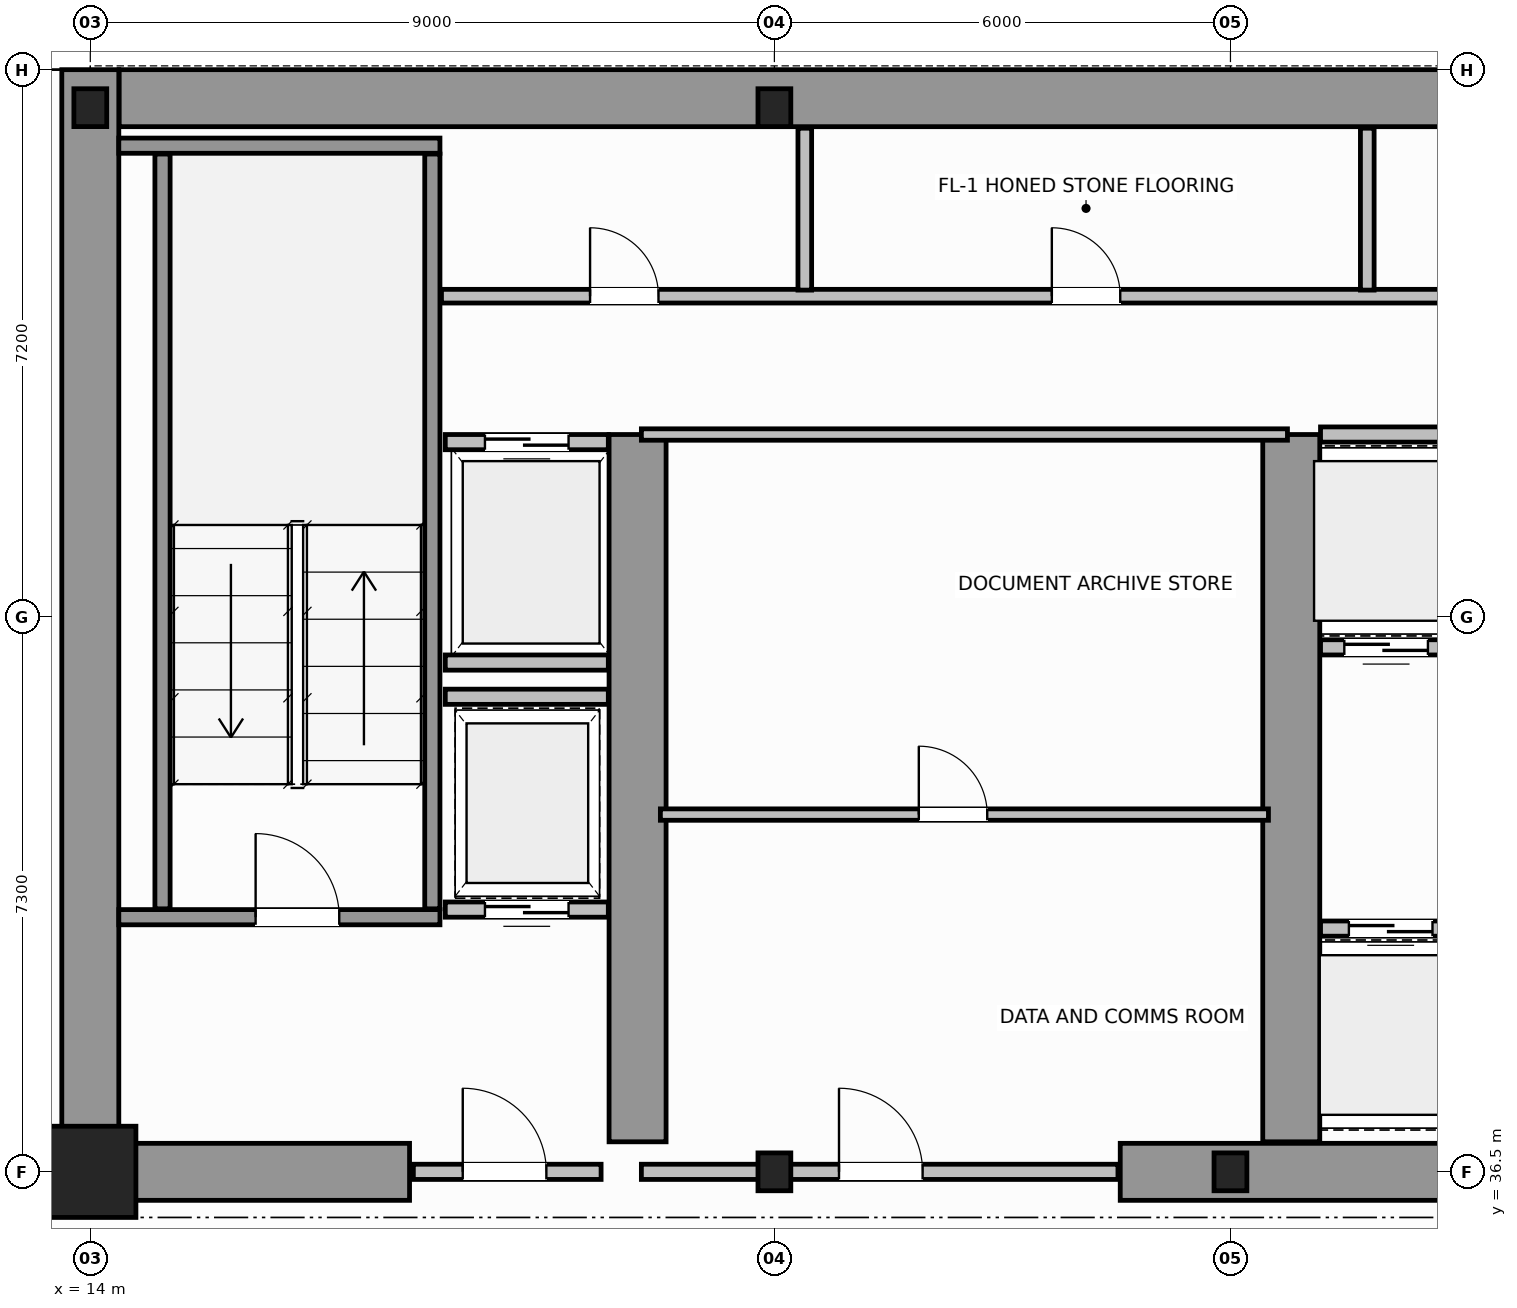
"""IFC4 building model, lengths in metres.
Left out: names, types, materials, properties, quantities, classifications, styles, units other than length and angle.
Written with IfcOpenShell. Run it as: python <this file> out.ifc"""

import sys

from ifc_helpers import new_model, si_unit, direction, frame, frame_2d, origin, origin_2d, place, context, subcontext, project, spatial, rectangle, i_section, extrude, source, transform, mapped, element, fill, save


model = new_model("IFC4")
c1 = context("Model", 3, precision=1e-05, world=origin(), true_north=direction((0.0, 1.0)))
c2 = subcontext(c1, "Body", "Model", "MODEL_VIEW")
j1 = project(units=[si_unit("LENGTHUNIT", "METRE"), si_unit("PLANEANGLEUNIT", "RADIAN")], contexts=[c1])
p1 = place(None, origin())
s1 = spatial("IfcSite", under=j1, at=p1, CompositionType="ELEMENT")
p2 = place(p1, origin())
s2 = spatial("IfcBuilding", under=s1, at=p2, CompositionType="ELEMENT")
p3 = place(p2, frame((0.0, 0.0, 161.4)))
s3 = spatial("IfcBuildingStorey", under=s2, at=p3, CompositionType="ELEMENT", Elevation=161.4)
m1 = source(origin(), c2, "Body", "SweptSolid", [
    extrude(rectangle(XDim=1.2, YDim=1.2, at=origin_2d()), origin(), (0.0, 0.0, 1.0), 3.8),
])
p4 = place(p3, frame((14.0, 36.5, 0.0), z_axis=(0.0, 0.0, 1.0), x_axis=(1.0, 0.0, 0.0)))
e1 = element("IfcColumn", 1, at=p4, inside=s3, PredefinedType="COLUMN", context=c2, shape_type="MappedRepresentation", body=[
    mapped(m1, transform((0.0, 0.0, 0.0), scale=1.0)),
])
m2 = source(origin(), c2, "Body", "SweptSolid", [
    extrude(i_section(OverallWidth=0.432, OverallDepth=0.498, WebThickness=0.055, FlangeThickness=0.068, FilletRadius=0.015, at=origin_2d()), origin(), (0.0, 0.0, 1.0), 3.8),
])
for number, where, z_axis, x_axis in (
    (2, (23.0, 36.5, 0.0), (0.0, 0.0, 1.0), (1.0, 0.0, 0.0)),
    (3, (29.0, 36.5, 0.0), (0.0, 0.0, 1.0), (1.0, 0.0, 0.0)),
    (4, (14.0, 50.5, 0.0), (0.0, 0.0, 1.0), (1.0, 0.0, 0.0)),
    (5, (23.0, 50.5, 0.0), (0.0, 0.0, 1.0), (1.0, 0.0, 0.0)),
):
    element("IfcColumn", number, at=place(p3, frame(where, z_axis=z_axis, x_axis=x_axis)), inside=s3, PredefinedType="COLUMN", context=c2, shape_type="MappedRepresentation", body=[
        mapped(m2, transform((0.0, 0.0, 0.0), scale=1.0)),
    ])
p5 = place(p3, frame((14.379, 50.625, 0.0), z_axis=(0.0, 0.0, 1.0), x_axis=(1.0, 0.0, 0.0)))
e6 = element("IfcWall", 6, at=p5, inside=s3, PredefinedType="SHEAR", context=c2, shape_type="SweptSolid", body=[
    extrude(rectangle(XDim=19.619, YDim=0.75, at=frame_2d((9.81, 0.0))), origin(), (0.0, 0.0, 1.0), 3.8),
])
p6 = place(p3, frame((14.0, 36.5, 0.0), z_axis=(0.0, 0.0, 1.0), x_axis=(0.0, 1.0, 0.0)))
e7 = element("IfcWall", 7, at=p6, inside=s3, PredefinedType="SHEAR", context=c2, shape_type="SweptSolid", body=[
    extrude(rectangle(XDim=14.5, YDim=0.75, at=frame_2d((7.25, 0.0))), origin(), (0.0, 0.0, 1.0), 3.8),
])
p7 = place(p3, frame((14.395, 36.5, 0.0), z_axis=(0.0, 0.0, 1.0), x_axis=(1.0, 0.0, 0.0)))
e8 = element("IfcWall", 8, at=p7, inside=s3, PredefinedType="SHEAR", context=c2, shape_type="SweptSolid", body=[
    extrude(rectangle(XDim=3.805, YDim=0.75, at=frame_2d((1.902, 0.0))), origin(), (0.0, 0.0, 1.0), 2.38),
])
p8 = place(p3, frame((27.55, 36.5, 0.0), z_axis=(0.0, 0.0, 1.0), x_axis=(1.0, 0.0, 0.0)))
e9 = element("IfcWall", 9, at=p8, inside=s3, PredefinedType="SHEAR", context=c2, shape_type="SweptSolid", body=[
    extrude(rectangle(XDim=4.5, YDim=0.75, at=frame_2d((2.25, 0.0))), origin(), (0.0, 0.0, 1.0), 3.8),
])
for number, where, z_axis, x_axis in (
    (10, (21.2, 36.895, 0.0), (0.0, 0.0, 1.0), (0.0, 1.0, 0.0)),
    (11, (29.8, 36.895, 0.0), (0.0, 0.0, 1.0), (0.0, 1.0, 0.0)),
):
    element("IfcWall", number, at=place(p3, frame(where, z_axis=z_axis, x_axis=x_axis)), inside=s3, PredefinedType="SHEAR", context=c2, shape_type="SweptSolid", body=[
        extrude(rectangle(XDim=9.305, YDim=0.75, at=frame_2d((4.652, 0.0))), origin(), (0.0, 0.0, 1.0), 3.8),
    ])
p9 = place(p3, frame((14.375, 39.85, 0.0), z_axis=(0.0, 0.0, 1.0), x_axis=(1.0, 0.0, 0.0)))
e12 = element("IfcWall", 12, at=p9, inside=s3, PredefinedType="SOLIDWALL", context=c2, shape_type="SweptSolid", body=[
    extrude(rectangle(XDim=4.225, YDim=0.2, at=frame_2d((2.113, 0.0))), origin(), (0.0, 0.0, 1.0), 3.8),
])
p10 = place(p9, frame((1.8, 0.0, 0.0)))
e13 = element("IfcOpeningElement", 13, at=p10, cuts=e12, PredefinedType="OPENING", context=c2, shape_type="SweptSolid", body=[
    extrude(rectangle(XDim=1.1, YDim=2.15, at=frame_2d((0.55, 1.075))), frame((0.0, 0.11, 0.0), z_axis=(0.0, -1.0, 0.0), x_axis=(1.0, 0.0, 0.0)), (0.0, 0.0, 1.0), 0.22),
])
p11 = place(p3, frame((14.375, 50.0, 0.0), z_axis=(0.0, 0.0, 1.0), x_axis=(1.0, 0.0, 0.0)))
e14 = element("IfcWall", 14, at=p11, inside=s3, PredefinedType="SOLIDWALL", context=c2, shape_type="SweptSolid", body=[
    extrude(rectangle(XDim=4.225, YDim=0.2, at=frame_2d((2.113, 0.0))), origin(), (0.0, 0.0, 1.0), 3.8),
])
for number, where, z_axis, x_axis in (
    (15, (14.95, 39.96, 0.0), (0.0, 0.0, 1.0), (0.0, 1.0, 0.0)),
    (16, (18.5, 39.96, 0.0), (0.0, 0.0, 1.0), (0.0, 1.0, 0.0)),
):
    element("IfcWall", number, at=place(p3, frame(where, z_axis=z_axis, x_axis=x_axis)), inside=s3, PredefinedType="SOLIDWALL", context=c2, shape_type="SweptSolid", body=[
        extrude(rectangle(XDim=9.93, YDim=0.2, at=frame_2d((4.965, 0.0))), origin(), (0.0, 0.0, 1.0), 3.8),
    ])
p12 = place(p3, frame((18.25, 36.5, 0.0), z_axis=(0.0, 0.0, 1.0), x_axis=(1.0, 0.0, 0.0)))
e17 = element("IfcWall", 17, at=p12, inside=s3, PredefinedType="SOLIDWALL", context=c2, shape_type="SweptSolid", body=[
    extrude(rectangle(XDim=2.47, YDim=0.2, at=frame_2d((1.235, 0.0))), origin(), (0.0, 0.0, 1.0), 2.37),
])
p13 = place(p12, frame((0.65, 0.0, 0.0)))
e18 = element("IfcOpeningElement", 18, at=p13, cuts=e17, PredefinedType="OPENING", context=c2, shape_type="SweptSolid", body=[
    extrude(rectangle(XDim=1.1, YDim=2.15, at=frame_2d((0.55, 1.075))), frame((0.0, 0.11, 0.0), z_axis=(0.0, -1.0, 0.0), x_axis=(1.0, 0.0, 0.0)), (0.0, 0.0, 1.0), 0.22),
])
p14 = place(p3, frame((30.185, 39.7, 0.0), z_axis=(0.0, 0.0, 1.0), x_axis=(1.0, 0.0, 0.0)))
e19 = element("IfcWall", 19, at=p14, inside=s3, PredefinedType="SOLIDWALL", context=c2, shape_type="SweptSolid", body=[
    extrude(rectangle(XDim=1.845, YDim=0.2, at=frame_2d((0.922, 0.0))), origin(), (0.0, 0.0, 1.0), 3.58),
])
p15 = place(p14, frame((0.373, 0.0, 0.0)))
e20 = element("IfcOpeningElement", 20, at=p15, cuts=e19, PredefinedType="OPENING", context=c2, shape_type="SweptSolid", body=[
    extrude(rectangle(XDim=1.1, YDim=2.15, at=frame_2d((0.55, 1.075))), frame((0.0, 0.11, 0.0), z_axis=(0.0, -1.0, 0.0), x_axis=(1.0, 0.0, 0.0)), (0.0, 0.0, 1.0), 0.22),
])
p16 = place(p3, frame((30.185, 43.4, 0.0), z_axis=(0.0, 0.0, 1.0), x_axis=(1.0, 0.0, 0.0)))
e21 = element("IfcWall", 21, at=p16, inside=s3, PredefinedType="SOLIDWALL", context=c2, shape_type="SweptSolid", body=[
    extrude(rectangle(XDim=1.725, YDim=0.2, at=frame_2d((0.862, 0.0))), origin(), (0.0, 0.0, 1.0), 3.58),
])
p17 = place(p16, frame((0.313, 0.0, 0.0)))
e22 = element("IfcOpeningElement", 22, at=p17, cuts=e21, PredefinedType="OPENING", context=c2, shape_type="SweptSolid", body=[
    extrude(rectangle(XDim=1.1, YDim=2.15, at=frame_2d((0.55, 1.075))), frame((0.0, 0.11, 0.0), z_axis=(0.0, -1.0, 0.0), x_axis=(1.0, 0.0, 0.0)), (0.0, 0.0, 1.0), 0.22),
])
p18 = place(p3, frame((30.185, 46.2, 0.0), z_axis=(0.0, 0.0, 1.0), x_axis=(1.0, 0.0, 0.0)))
e23 = element("IfcWall", 23, at=p18, inside=s3, PredefinedType="SOLIDWALL", context=c2, shape_type="SweptSolid", body=[
    extrude(rectangle(XDim=1.725, YDim=0.2, at=frame_2d((0.862, 0.0))), origin(), (0.0, 0.0, 1.0), 3.58),
])
p19 = place(p3, frame((18.67, 46.1, 0.0), z_axis=(0.0, 0.0, 1.0), x_axis=(1.0, 0.0, 0.0)))
e24 = element("IfcWall", 24, at=p19, inside=s3, PredefinedType="SOLIDWALL", context=c2, shape_type="SweptSolid", body=[
    extrude(rectangle(XDim=2.145, YDim=0.2, at=frame_2d((1.073, 0.0))), origin(), (0.0, 0.0, 1.0), 3.58),
])
p20 = place(p19, frame((0.522, 0.0, 0.0)))
e25 = element("IfcOpeningElement", 25, at=p20, cuts=e24, PredefinedType="OPENING", context=c2, shape_type="SweptSolid", body=[
    extrude(rectangle(XDim=1.1, YDim=2.15, at=frame_2d((0.55, 1.075))), frame((0.0, 0.11, 0.0), z_axis=(0.0, -1.0, 0.0), x_axis=(1.0, 0.0, 0.0)), (0.0, 0.0, 1.0), 0.22),
])
p21 = place(p3, frame((18.67, 43.2, 0.0), z_axis=(0.0, 0.0, 1.0), x_axis=(1.0, 0.0, 0.0)))
e26 = element("IfcWall", 26, at=p21, inside=s3, PredefinedType="SOLIDWALL", context=c2, shape_type="SweptSolid", body=[
    extrude(rectangle(XDim=2.145, YDim=0.2, at=frame_2d((1.073, 0.0))), origin(), (0.0, 0.0, 1.0), 3.58),
])
p22 = place(p3, frame((18.67, 39.95, 0.0), z_axis=(0.0, 0.0, 1.0), x_axis=(1.0, 0.0, 0.0)))
e27 = element("IfcWall", 27, at=p22, inside=s3, PredefinedType="SOLIDWALL", context=c2, shape_type="SweptSolid", body=[
    extrude(rectangle(XDim=2.145, YDim=0.2, at=frame_2d((1.073, 0.0))), origin(), (0.0, 0.0, 1.0), 3.58),
])
p23 = place(p22, frame((0.522, 0.0, 0.0)))
e28 = element("IfcOpeningElement", 28, at=p23, cuts=e27, PredefinedType="OPENING", context=c2, shape_type="SweptSolid", body=[
    extrude(rectangle(XDim=1.1, YDim=2.15, at=frame_2d((0.55, 1.075))), frame((0.0, 0.11, 0.0), z_axis=(0.0, -1.0, 0.0), x_axis=(1.0, 0.0, 0.0)), (0.0, 0.0, 1.0), 0.22),
])
p24 = place(p3, frame((18.67, 42.75, 0.0), z_axis=(0.0, 0.0, 1.0), x_axis=(1.0, 0.0, 0.0)))
e29 = element("IfcWall", 29, at=p24, inside=s3, PredefinedType="SOLIDWALL", context=c2, shape_type="SweptSolid", body=[
    extrude(rectangle(XDim=2.145, YDim=0.2, at=frame_2d((1.073, 0.0))), origin(), (0.0, 0.0, 1.0), 3.58),
])
p25 = place(p3, frame((21.25, 36.5, 0.0), z_axis=(0.0, 0.0, 1.0), x_axis=(1.0, 0.0, 0.0)))
e30 = element("IfcWall", 30, at=p25, inside=s3, PredefinedType="SOLIDWALL", context=c2, shape_type="SweptSolid", body=[
    extrude(rectangle(XDim=6.27, YDim=0.2, at=frame_2d((3.135, 0.0))), origin(), (0.0, 0.0, 1.0), 2.37),
])
p26 = place(p25, frame((2.6, 0.0, 0.0)))
e31 = element("IfcOpeningElement", 31, at=p26, cuts=e30, PredefinedType="OPENING", context=c2, shape_type="SweptSolid", body=[
    extrude(rectangle(XDim=1.1, YDim=2.15, at=frame_2d((0.55, 1.075))), frame((0.0, 0.11, 0.0), z_axis=(0.0, -1.0, 0.0), x_axis=(1.0, 0.0, 0.0)), (0.0, 0.0, 1.0), 0.22),
])
p27 = place(p3, frame((21.25, 46.2, 0.0), z_axis=(0.0, 0.0, 1.0), x_axis=(1.0, 0.0, 0.0)))
e32 = element("IfcWall", 32, at=p27, inside=s3, PredefinedType="PARTITIONING", context=c2, shape_type="SweptSolid", body=[
    extrude(rectangle(XDim=8.5, YDim=0.15, at=frame_2d((4.25, 0.0))), origin(), (0.0, 0.0, 1.0), 3.58),
])
p28 = place(p3, frame((21.5, 41.2, 0.0), z_axis=(0.0, 0.0, 1.0), x_axis=(1.0, 0.0, 0.0)))
e33 = element("IfcWall", 33, at=p28, inside=s3, PredefinedType="PARTITIONING", context=c2, shape_type="SweptSolid", body=[
    extrude(rectangle(XDim=8.0, YDim=0.15, at=frame_2d((4.0, 0.0))), origin(), (0.0, 0.0, 1.0), 3.58),
])
p29 = place(p28, frame((3.4, 0.0, 0.0)))
e34 = element("IfcOpeningElement", 34, at=p29, cuts=e33, PredefinedType="OPENING", context=c2, shape_type="SweptSolid", body=[
    extrude(rectangle(XDim=0.9, YDim=2.1, at=frame_2d((0.45, 1.05))), frame((0.0, 0.085, 0.0), z_axis=(0.0, -1.0, 0.0), x_axis=(1.0, 0.0, 0.0)), (0.0, 0.0, 1.0), 0.17),
])
p30 = place(p3, frame((18.62, 48.02, 0.0), z_axis=(0.0, 0.0, 1.0), x_axis=(1.0, 0.0, 0.0)))
e35 = element("IfcWall", 35, at=p30, inside=s3, PredefinedType="PLUMBINGWALL", context=c2, shape_type="SweptSolid", body=[
    extrude(rectangle(XDim=30.76, YDim=0.18, at=frame_2d((15.38, 0.0))), origin(), (0.0, 0.0, 1.0), 3.58),
])
p31 = place(p30, frame((1.955, 0.0, 0.0)))
e36 = element("IfcOpeningElement", 36, at=p31, cuts=e35, PredefinedType="OPENING", context=c2, shape_type="SweptSolid", body=[
    extrude(rectangle(XDim=0.9, YDim=2.15, at=frame_2d((0.45, 1.075))), frame((0.0, 0.1, 0.0), z_axis=(0.0, -1.0, 0.0), x_axis=(1.0, 0.0, 0.0)), (0.0, 0.0, 1.0), 0.2),
])
p32 = place(p30, frame((8.03, 0.0, 0.0)))
e37 = element("IfcOpeningElement", 37, at=p32, cuts=e35, PredefinedType="OPENING", context=c2, shape_type="SweptSolid", body=[
    extrude(rectangle(XDim=0.9, YDim=2.15, at=frame_2d((0.45, 1.075))), frame((0.0, 0.1, 0.0), z_axis=(0.0, -1.0, 0.0), x_axis=(1.0, 0.0, 0.0)), (0.0, 0.0, 1.0), 0.2),
])
p33 = place(p30, frame((16.93, 0.0, 0.0)))
e38 = element("IfcOpeningElement", 38, at=p33, cuts=e35, PredefinedType="OPENING", context=c2, shape_type="SweptSolid", body=[
    extrude(rectangle(XDim=0.9, YDim=2.15, at=frame_2d((0.45, 1.075))), frame((0.0, 0.1, 0.0), z_axis=(0.0, -1.0, 0.0), x_axis=(1.0, 0.0, 0.0)), (0.0, 0.0, 1.0), 0.2),
])
p34 = place(p30, frame((26.205, 0.0, 0.0)))
e39 = element("IfcOpeningElement", 39, at=p34, cuts=e35, PredefinedType="OPENING", context=c2, shape_type="SweptSolid", body=[
    extrude(rectangle(XDim=0.9, YDim=2.15, at=frame_2d((0.45, 1.075))), frame((0.0, 0.1, 0.0), z_axis=(0.0, -1.0, 0.0), x_axis=(1.0, 0.0, 0.0)), (0.0, 0.0, 1.0), 0.2),
])
for number, where, z_axis, x_axis in (
    (40, (23.4, 48.1, 0.0), (0.0, 0.0, 1.0), (0.0, 1.0, 0.0)),
    (41, (30.8, 48.1, 0.0), (0.0, 0.0, 1.0), (0.0, 1.0, 0.0)),
):
    element("IfcWall", number, at=place(p3, frame(where, z_axis=z_axis, x_axis=x_axis)), inside=s3, PredefinedType="PLUMBINGWALL", context=c2, shape_type="SweptSolid", body=[
        extrude(rectangle(XDim=2.13, YDim=0.18, at=frame_2d((1.065, 0.0))), origin(), (0.0, 0.0, 1.0), 3.58),
    ])
p35 = place(p3, frame((7.274, 36.48, 0.0), z_axis=(0.0, 0.0, 1.0), x_axis=(1.0, 0.0, 0.0)))
e42 = element("IfcWall", 42, at=p35, inside=s3, PredefinedType="PARTITIONING", context=c2, shape_type="SweptSolid", body=[
    extrude(rectangle(XDim=6.666, YDim=0.12, at=frame_2d((3.333, 0.0))), origin(), (0.0, 0.0, 1.0), 2.97),
])
p36 = place(p35, frame((2.883, 0.0, 0.0)))
e43 = element("IfcOpeningElement", 43, at=p36, cuts=e42, PredefinedType="OPENING", context=c2, shape_type="SweptSolid", body=[
    extrude(rectangle(XDim=0.9, YDim=2.15, at=frame_2d((0.45, 1.075))), frame((0.0, 0.07, 0.0), z_axis=(0.0, -1.0, 0.0), x_axis=(1.0, 0.0, 0.0)), (0.0, 0.0, 1.0), 0.14),
])
m3 = source(origin(), c2, "Body", "SweptSolid", [
    extrude(rectangle(XDim=1.1, YDim=2.15, at=frame_2d((0.55, 1.075))), frame((0.0, 0.025, 0.0), z_axis=(0.0, -1.0, 0.0), x_axis=(1.0, 0.0, 0.0)), (0.0, 0.0, 1.0), 0.05),
])
p37 = place(p10, origin())
e44 = element("IfcDoor", 44, at=p37, inside=s3, OperationType="SINGLE_SWING_LEFT", PredefinedType="DOOR", context=c2, shape_type="MappedRepresentation", body=[
    mapped(m3, transform((0.0, 0.0, 0.0), scale=1.0)),
])
fill(e13, e44)
p38 = place(p13, origin())
e45 = element("IfcDoor", 45, at=p38, inside=s3, OperationType="SINGLE_SWING_RIGHT", PredefinedType="DOOR", context=c2, shape_type="MappedRepresentation", body=[
    mapped(m3, transform((0.0, 0.0, 0.0), scale=1.0)),
])
fill(e18, e45)
p39 = place(p15, origin())
e46 = element("IfcDoor", 46, at=p39, inside=s3, OperationType="DOUBLE_DOOR_SLIDING", PredefinedType="DOOR", context=c2, shape_type="MappedRepresentation", body=[
    mapped(m3, transform((0.0, 0.0, 0.0), scale=1.0)),
])
fill(e20, e46)
p40 = place(p17, origin())
e47 = element("IfcDoor", 47, at=p40, inside=s3, OperationType="DOUBLE_DOOR_SLIDING", PredefinedType="DOOR", context=c2, shape_type="MappedRepresentation", body=[
    mapped(m3, transform((0.0, 0.0, 0.0), scale=1.0)),
])
fill(e22, e47)
p41 = place(p20, origin())
e48 = element("IfcDoor", 48, at=p41, inside=s3, OperationType="DOUBLE_DOOR_SLIDING", PredefinedType="DOOR", context=c2, shape_type="MappedRepresentation", body=[
    mapped(m3, transform((0.0, 0.0, 0.0), scale=1.0)),
])
fill(e25, e48)
p42 = place(p23, origin())
e49 = element("IfcDoor", 49, at=p42, inside=s3, OperationType="DOUBLE_DOOR_SLIDING", PredefinedType="DOOR", context=c2, shape_type="MappedRepresentation", body=[
    mapped(m3, transform((0.0, 0.0, 0.0), scale=1.0)),
])
fill(e28, e49)
p43 = place(p26, origin())
e50 = element("IfcDoor", 50, at=p43, inside=s3, OperationType="SINGLE_SWING_LEFT", PredefinedType="DOOR", context=c2, shape_type="MappedRepresentation", body=[
    mapped(m3, transform((0.0, 0.0, 0.0), scale=1.0)),
])
fill(e31, e50)
m4 = source(origin(), c2, "Body", "SweptSolid", [
    extrude(rectangle(XDim=0.9, YDim=2.1, at=frame_2d((0.45, 1.05))), frame((0.0, 0.025, 0.0), z_axis=(0.0, -1.0, 0.0), x_axis=(1.0, 0.0, 0.0)), (0.0, 0.0, 1.0), 0.05),
])
p44 = place(p29, origin())
e51 = element("IfcDoor", 51, at=p44, inside=s3, OperationType="SINGLE_SWING_RIGHT", PredefinedType="DOOR", context=c2, shape_type="MappedRepresentation", body=[
    mapped(m4, transform((0.0, 0.0, 0.0), scale=1.0)),
])
fill(e34, e51)
m5 = source(origin(), c2, "Body", "SweptSolid", [
    extrude(rectangle(XDim=0.9, YDim=2.15, at=frame_2d((0.45, 1.075))), frame((0.0, 0.025, 0.0), z_axis=(0.0, -1.0, 0.0), x_axis=(1.0, 0.0, 0.0)), (0.0, 0.0, 1.0), 0.05),
])
p45 = place(p31, origin())
e52 = element("IfcDoor", 52, at=p45, inside=s3, OperationType="SINGLE_SWING_LEFT", PredefinedType="DOOR", context=c2, shape_type="MappedRepresentation", body=[
    mapped(m5, transform((0.0, 0.0, 0.0), scale=1.0)),
])
fill(e36, e52)
p46 = place(p32, origin())
e53 = element("IfcDoor", 53, at=p46, inside=s3, OperationType="SINGLE_SWING_RIGHT", PredefinedType="DOOR", context=c2, shape_type="MappedRepresentation", body=[
    mapped(m5, transform((0.0, 0.0, 0.0), scale=1.0)),
])
fill(e37, e53)
save(model, sys.argv[1])
